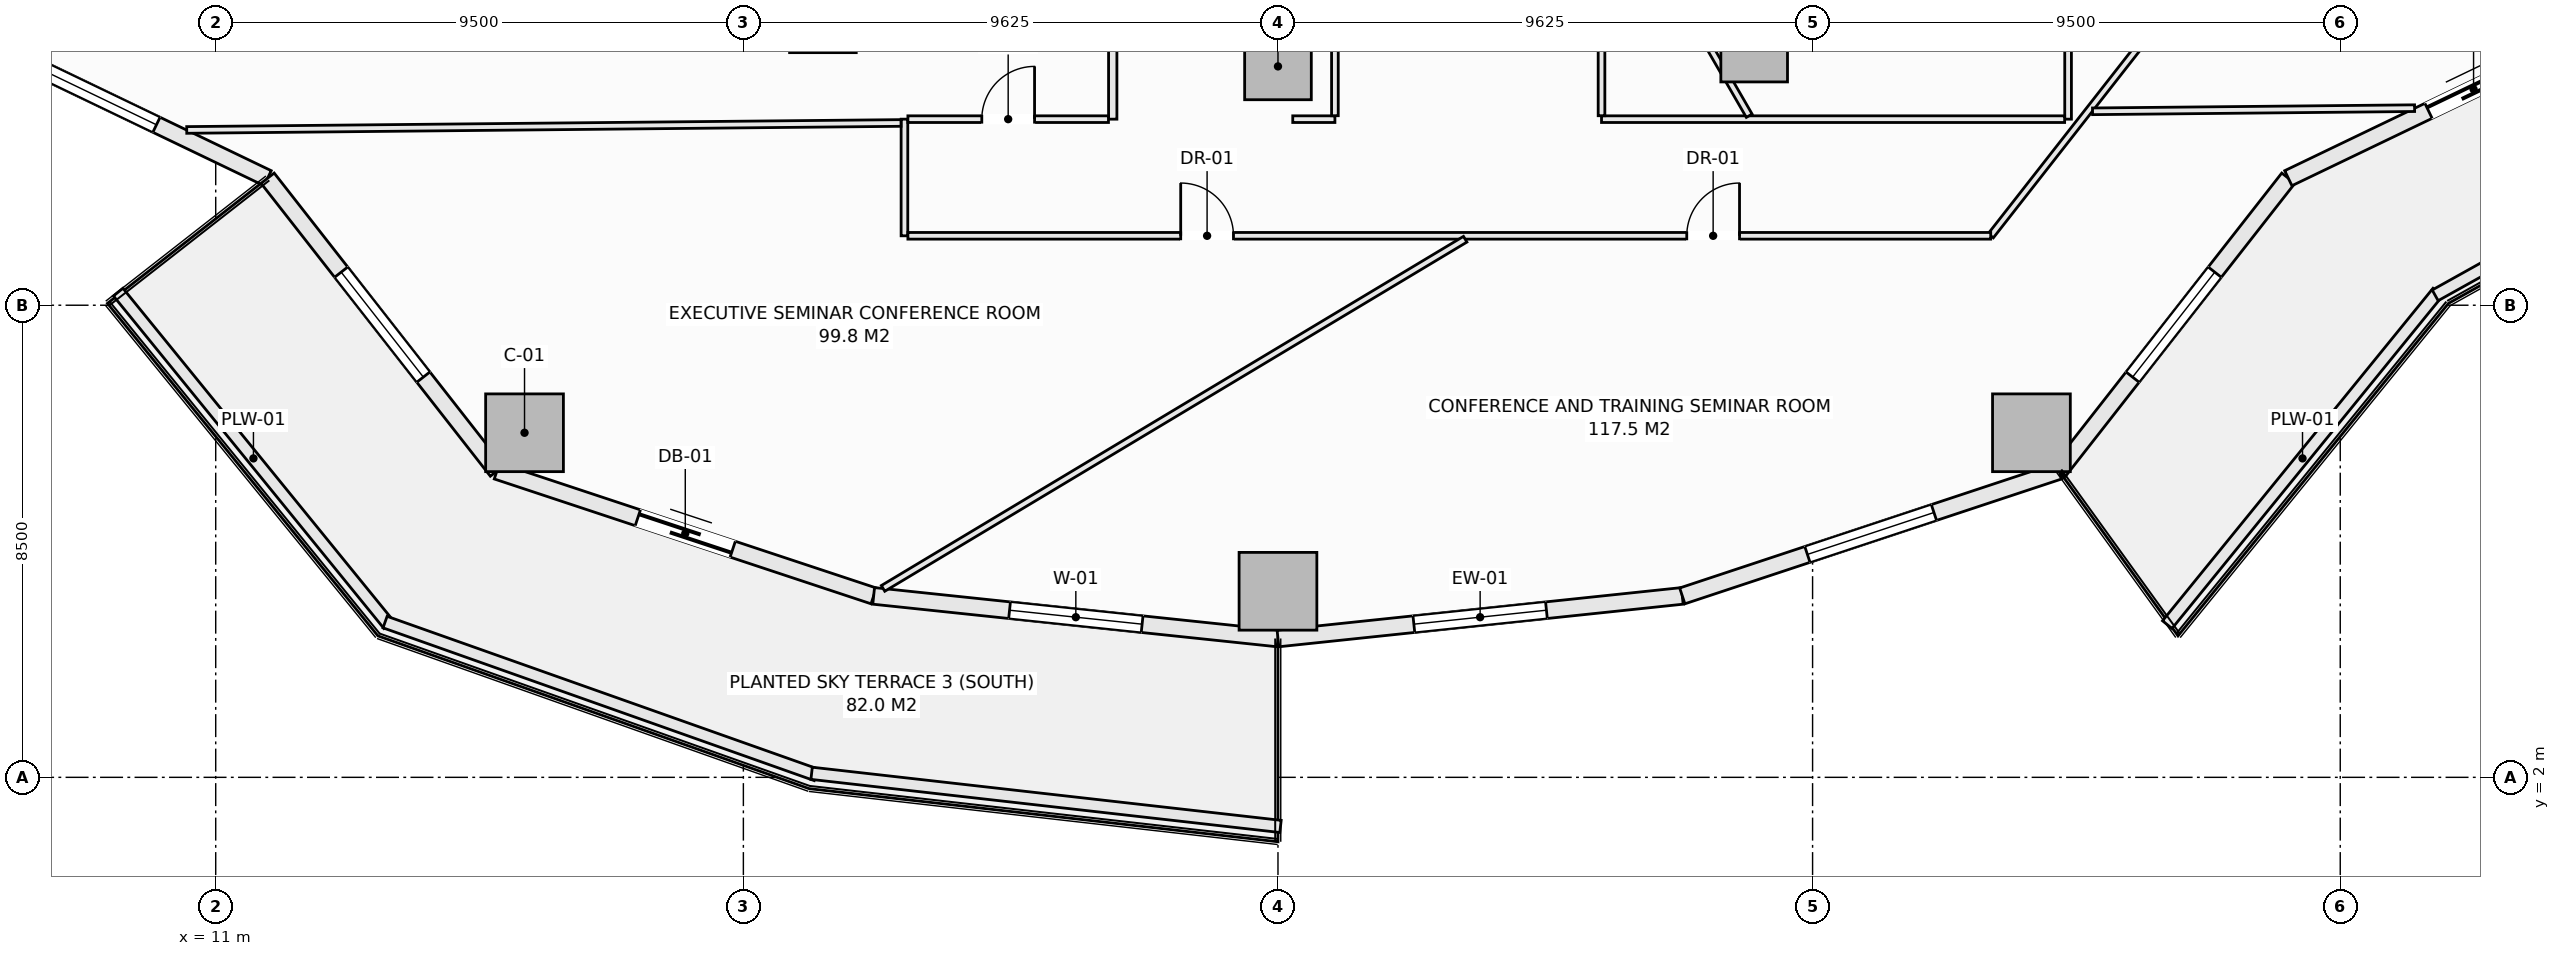
"""IFC4 building model, lengths in metres.
Left out: names, types, materials, properties, quantities, classifications, styles, units other than length and angle.
Written with IfcOpenShell. Run it as: python <this file> out.ifc"""

import sys

from ifc_helpers import new_model, si_unit, direction, frame, frame_2d, origin, origin_2d, place, context, subcontext, project, spatial, rectangle, extrude, element, fill, save


model = new_model("IFC4")
c1 = context("Model", 3, precision=1e-05, world=origin(), true_north=direction((0.0, 1.0)))
c2 = subcontext(c1, "Body", "Model", "MODEL_VIEW")
j1 = project(units=[si_unit("LENGTHUNIT", "METRE"), si_unit("PLANEANGLEUNIT", "RADIAN")], contexts=[c1])
p1 = place(None, origin())
s1 = spatial("IfcSite", under=j1, at=p1, CompositionType="ELEMENT")
p2 = place(p1, origin())
s2 = spatial("IfcBuilding", under=s1, at=p2, CompositionType="ELEMENT")
p3 = place(p2, frame((0.0, 0.0, 41.9)))
s3 = spatial("IfcBuildingStorey", under=s2, at=p3, CompositionType="ELEMENT", Elevation=41.9)
for number, where, z_axis, x_axis in (
    (1, (16.56, 8.204, -0.28), (0.0, 0.0, 1.0), (1.0, 0.0, 0.0)),
    (2, (30.125, 5.35, -0.28), (0.0, 0.0, 1.0), (1.0, 0.0, 0.0)),
    (3, (43.69, 8.204, -0.28), (0.0, 0.0, 1.0), (1.0, 0.0, 0.0)),
):
    element("IfcColumn", number, at=place(p3, frame(where, z_axis=z_axis, x_axis=x_axis)), inside=s3, PredefinedType="COLUMN", context=c2, shape_type="SweptSolid", body=[
        extrude(rectangle(XDim=1.4, YDim=1.4, at=origin_2d()), origin(), (0.0, 0.0, 1.0), 3.85),
    ])
for number, where, z_axis, x_axis in (
    (4, (21.932, 15.648, -0.28), (0.0, 0.0, 1.0), (1.0, 0.0, 0.0)),
    (5, (30.125, 14.8, -0.28), (0.0, 0.0, 1.0), (1.0, 0.0, 0.0)),
    (6, (38.698, 15.121, -0.28), (0.0, 0.0, 1.0), (1.0, 0.0, 0.0)),
):
    element("IfcColumn", number, at=place(p3, frame(where, z_axis=z_axis, x_axis=x_axis)), inside=s3, PredefinedType="COLUMN", context=c2, shape_type="SweptSolid", body=[
        extrude(rectangle(XDim=1.2, YDim=1.2, at=origin_2d()), origin(), (0.0, 0.0, 1.0), 3.85),
    ])
p4 = place(p3, frame((5.768, 15.75, 0.0), z_axis=(0.0, 0.0, 1.0), x_axis=(0.901360393999, -0.433069786673, 0.0)))
e7 = element("IfcWall", 7, at=p4, inside=s3, PredefinedType="SOLIDWALL", context=c2, shape_type="SweptSolid", body=[
    extrude(rectangle(XDim=6.842, YDim=0.3, at=frame_2d((3.421, 0.0))), origin(), (0.0, 0.0, 1.0), 3.093),
])
p5 = place(p4, frame((2.221, 0.0, 0.85)))
e8 = element("IfcOpeningElement", 8, at=p5, cuts=e7, PredefinedType="OPENING", context=c2, shape_type="SweptSolid", body=[
    extrude(rectangle(XDim=2.4, YDim=1.9, at=frame_2d((1.2, 0.95))), frame((0.0, 0.16, 0.0), z_axis=(0.0, -1.0, 0.0), x_axis=(1.0, 0.0, 0.0)), (0.0, 0.0, 1.0), 0.32),
])
p6 = place(p3, frame((11.935, 12.787, 0.0), z_axis=(0.0, 0.0, 1.0), x_axis=(0.616421309777, -0.787416515482, 0.0)))
e9 = element("IfcWall", 9, at=p6, inside=s3, PredefinedType="SOLIDWALL", context=c2, shape_type="SweptSolid", body=[
    extrude(rectangle(XDim=6.696, YDim=0.3, at=frame_2d((3.348, 0.0))), origin(), (0.0, 0.0, 1.0), 3.093),
])
p7 = place(p6, frame((2.148, 0.0, 0.85)))
e10 = element("IfcOpeningElement", 10, at=p7, cuts=e9, PredefinedType="OPENING", context=c2, shape_type="SweptSolid", body=[
    extrude(rectangle(XDim=2.4, YDim=1.9, at=frame_2d((1.2, 0.95))), frame((0.0, 0.16, 0.0), z_axis=(0.0, -1.0, 0.0), x_axis=(1.0, 0.0, 0.0)), (0.0, 0.0, 1.0), 0.32),
])
p8 = place(p3, frame((16.062, 7.514, 0.0), z_axis=(0.0, 0.0, 1.0), x_axis=(0.949238715533, -0.31455661006, 0.0)))
e11 = element("IfcWall", 11, at=p8, inside=s3, PredefinedType="SOLIDWALL", context=c2, shape_type="SweptSolid", body=[
    extrude(rectangle(XDim=7.146, YDim=0.3, at=frame_2d((3.573, 0.0))), origin(), (0.0, 0.0, 1.0), 3.093),
])
p9 = place(p8, frame((2.673, 0.0, 0.0)))
e12 = element("IfcOpeningElement", 12, at=p9, cuts=e11, PredefinedType="OPENING", context=c2, shape_type="SweptSolid", body=[
    extrude(rectangle(XDim=1.8, YDim=2.25, at=frame_2d((0.9, 1.125))), frame((0.0, 0.16, 0.0), z_axis=(0.0, -1.0, 0.0), x_axis=(1.0, 0.0, 0.0)), (0.0, 0.0, 1.0), 0.32),
])
p10 = place(p3, frame((22.846, 5.267, 0.0), z_axis=(0.0, 0.0, 1.0), x_axis=(0.994500334317, -0.104733399844, 0.0)))
e13 = element("IfcWall", 13, at=p10, inside=s3, PredefinedType="SOLIDWALL", context=c2, shape_type="SweptSolid", body=[
    extrude(rectangle(XDim=7.32, YDim=0.3, at=frame_2d((3.66, 0.0))), origin(), (0.0, 0.0, 1.0), 3.093),
])
p11 = place(p10, frame((2.46, 0.0, 0.85)))
e14 = element("IfcOpeningElement", 14, at=p11, cuts=e13, PredefinedType="OPENING", context=c2, shape_type="SweptSolid", body=[
    extrude(rectangle(XDim=2.4, YDim=1.9, at=frame_2d((1.2, 0.95))), frame((0.0, 0.16, 0.0), z_axis=(0.0, -1.0, 0.0), x_axis=(1.0, 0.0, 0.0)), (0.0, 0.0, 1.0), 0.32),
])
p12 = place(p3, frame((30.125, 4.5, 0.0), z_axis=(0.0, 0.0, 1.0), x_axis=(0.994500334317, 0.104733399844, 0.0)))
e15 = element("IfcWall", 15, at=p12, inside=s3, PredefinedType="SOLIDWALL", context=c2, shape_type="SweptSolid", body=[
    extrude(rectangle(XDim=7.32, YDim=0.3, at=frame_2d((3.66, 0.0))), origin(), (0.0, 0.0, 1.0), 3.093),
])
p13 = place(p12, frame((2.46, 0.0, 0.85)))
e16 = element("IfcOpeningElement", 16, at=p13, cuts=e15, PredefinedType="OPENING", context=c2, shape_type="SweptSolid", body=[
    extrude(rectangle(XDim=2.4, YDim=1.9, at=frame_2d((1.2, 0.95))), frame((0.0, 0.16, 0.0), z_axis=(0.0, -1.0, 0.0), x_axis=(1.0, 0.0, 0.0)), (0.0, 0.0, 1.0), 0.32),
])
p14 = place(p3, frame((37.404, 5.267, 0.0), z_axis=(0.0, 0.0, 1.0), x_axis=(0.949238715533, 0.31455661006, 0.0)))
e17 = element("IfcWall", 17, at=p14, inside=s3, PredefinedType="SOLIDWALL", context=c2, shape_type="SweptSolid", body=[
    extrude(rectangle(XDim=7.146, YDim=0.3, at=frame_2d((3.573, 0.0))), origin(), (0.0, 0.0, 1.0), 3.093),
])
p15 = place(p14, frame((2.373, 0.0, 0.85)))
e18 = element("IfcOpeningElement", 18, at=p15, cuts=e17, PredefinedType="OPENING", context=c2, shape_type="SweptSolid", body=[
    extrude(rectangle(XDim=2.4, YDim=1.9, at=frame_2d((1.2, 0.95))), frame((0.0, 0.16, 0.0), z_axis=(0.0, -1.0, 0.0), x_axis=(1.0, 0.0, 0.0)), (0.0, 0.0, 1.0), 0.32),
])
p16 = place(p3, frame((44.188, 7.514, 0.0), z_axis=(0.0, 0.0, 1.0), x_axis=(0.616421309777, 0.787416515482, 0.0)))
e19 = element("IfcWall", 19, at=p16, inside=s3, PredefinedType="SOLIDWALL", context=c2, shape_type="SweptSolid", body=[
    extrude(rectangle(XDim=6.696, YDim=0.3, at=frame_2d((3.348, 0.0))), origin(), (0.0, 0.0, 1.0), 3.093),
])
p17 = place(p16, frame((2.148, 0.0, 0.85)))
e20 = element("IfcOpeningElement", 20, at=p17, cuts=e19, PredefinedType="OPENING", context=c2, shape_type="SweptSolid", body=[
    extrude(rectangle(XDim=2.4, YDim=1.9, at=frame_2d((1.2, 0.95))), frame((0.0, 0.16, 0.0), z_axis=(0.0, -1.0, 0.0), x_axis=(1.0, 0.0, 0.0)), (0.0, 0.0, 1.0), 0.32),
])
p18 = place(p3, frame((48.315, 12.787, 0.0), z_axis=(0.0, 0.0, 1.0), x_axis=(0.901360393999, 0.433069786673, 0.0)))
e21 = element("IfcWall", 21, at=p18, inside=s3, PredefinedType="SOLIDWALL", context=c2, shape_type="SweptSolid", body=[
    extrude(rectangle(XDim=6.842, YDim=0.3, at=frame_2d((3.421, 0.0))), origin(), (0.0, 0.0, 1.0), 3.093),
])
p19 = place(p18, frame((2.8, 0.0, 0.0)))
e22 = element("IfcOpeningElement", 22, at=p19, cuts=e21, PredefinedType="OPENING", context=c2, shape_type="SweptSolid", body=[
    extrude(rectangle(XDim=1.8, YDim=2.25, at=frame_2d((0.9, 1.125))), frame((0.0, 0.16, 0.0), z_axis=(0.0, -1.0, 0.0), x_axis=(1.0, 0.0, 0.0)), (0.0, 0.0, 1.0), 0.32),
])
p20 = place(p3, frame((9.244, 10.736, 0.0), z_axis=(0.0, 0.0, 1.0), x_axis=(0.630997450658, -0.775784903993, 0.0)))
e23 = element("IfcWall", 23, at=p20, inside=s3, PredefinedType="PARAPET", context=c2, shape_type="SweptSolid", body=[
    extrude(rectangle(XDim=7.718, YDim=0.22, at=frame_2d((3.859, 0.0))), origin(), (0.0, 0.0, 1.0), 0.52),
])
p21 = place(p3, frame((14.049, 4.795, 0.0), z_axis=(0.0, 0.0, 1.0), x_axis=(0.942581348797, -0.333976647237, 0.0)))
e24 = element("IfcWall", 24, at=p21, inside=s3, PredefinedType="PARAPET", context=c2, shape_type="SweptSolid", body=[
    extrude(rectangle(XDim=8.236, YDim=0.22, at=frame_2d((4.118, 0.0))), origin(), (0.0, 0.0, 1.0), 0.52),
])
p22 = place(p3, frame((21.729, 2.073, 0.0), z_axis=(0.0, 0.0, 1.0), x_axis=(0.993644541351, -0.112563428535, 0.0)))
e25 = element("IfcWall", 25, at=p22, inside=s3, PredefinedType="PARAPET", context=c2, shape_type="SweptSolid", body=[
    extrude(rectangle(XDim=8.496, YDim=0.22, at=frame_2d((4.248, 0.0))), origin(), (0.0, 0.0, 1.0), 0.52),
])
p23 = place(p3, frame((46.136, 4.749, 0.0), z_axis=(0.0, 0.0, 1.0), x_axis=(0.630997450658, 0.775784903993, 0.0)))
e26 = element("IfcWall", 26, at=p23, inside=s3, PredefinedType="PARAPET", context=c2, shape_type="SweptSolid", body=[
    extrude(rectangle(XDim=7.718, YDim=0.22, at=frame_2d((3.859, 0.0))), origin(), (0.0, 0.0, 1.0), 0.52),
])
p24 = place(p3, frame((50.959, 10.678, 0.0), z_axis=(0.0, 0.0, 1.0), x_axis=(0.873500119739, 0.48682393205, 0.0)))
e27 = element("IfcWall", 27, at=p24, inside=s3, PredefinedType="PARAPET", context=c2, shape_type="SweptSolid", body=[
    extrude(rectangle(XDim=7.562, YDim=0.22, at=frame_2d((3.781, 0.0))), origin(), (0.0, 0.0, 1.0), 0.52),
])
p25 = place(p3, frame((27.15, 13.85, 0.0), z_axis=(0.0, 0.0, 1.0), x_axis=(0.0, 1.0, 0.0)))
e28 = element("IfcWall", 28, at=p25, inside=s3, PredefinedType="PARTITIONING", context=c2, shape_type="SweptSolid", body=[
    extrude(rectangle(XDim=3.123, YDim=0.15, at=frame_2d((1.562, 0.0))), origin(), (0.0, 0.0, 1.0), 3.57),
])
p26 = place(p3, frame((44.35, 13.85, 0.0), z_axis=(0.0, 0.0, 1.0), x_axis=(0.0, 1.0, 0.0)))
e29 = element("IfcWall", 29, at=p26, inside=s3, PredefinedType="PARTITIONING", context=c2, shape_type="SweptSolid", body=[
    extrude(rectangle(XDim=9.17, YDim=0.12, at=frame_2d((4.585, 0.0))), origin(), (0.0, 0.0, 1.0), 3.57),
])
p27 = place(p26, frame((4.11, 0.0, 0.0)))
e30 = element("IfcOpeningElement", 30, at=p27, cuts=e29, PredefinedType="OPENING", context=c2, shape_type="SweptSolid", body=[
    extrude(rectangle(XDim=0.95, YDim=2.1, at=frame_2d((0.475, 1.05))), frame((0.0, 0.07, 0.0), z_axis=(0.0, -1.0, 0.0), x_axis=(1.0, 0.0, 0.0)), (0.0, 0.0, 1.0), 0.14),
])
p28 = place(p3, frame((23.4, 11.75, 0.0), z_axis=(0.0, 0.0, 1.0), x_axis=(0.0, 1.0, 0.0)))
e31 = element("IfcWall", 31, at=p28, inside=s3, PredefinedType="PARTITIONING", context=c2, shape_type="SweptSolid", body=[
    extrude(rectangle(XDim=2.1, YDim=0.12, at=frame_2d((1.05, 0.0))), origin(), (0.0, 0.0, 1.0), 3.57),
])
p29 = place(p3, frame((42.957, 11.75, 0.0), z_axis=(0.0, 0.0, 1.0), x_axis=(0.616428289415, 0.78741105149, 0.0)))
e32 = element("IfcWall", 32, at=p29, inside=s3, PredefinedType="PARTITIONING", context=c2, shape_type="SweptSolid", body=[
    extrude(rectangle(XDim=5.375, YDim=0.12, at=frame_2d((2.687, 0.0))), origin(), (0.0, 0.0, 1.0), 3.57),
])
p30 = place(p3, frame((23.462, 11.75, 0.0), z_axis=(0.0, 0.0, 1.0), x_axis=(1.0, 0.0, 0.0)))
e33 = element("IfcWall", 33, at=p30, inside=s3, PredefinedType="PARTITIONING", context=c2, shape_type="SweptSolid", body=[
    extrude(rectangle(XDim=19.495, YDim=0.12, at=frame_2d((9.748, 0.0))), origin(), (0.0, 0.0, 1.0), 3.57),
])
p31 = place(p30, frame((4.912, 0.0, 0.0)))
e34 = element("IfcOpeningElement", 34, at=p31, cuts=e33, PredefinedType="OPENING", context=c2, shape_type="SweptSolid", body=[
    extrude(rectangle(XDim=0.95, YDim=2.1, at=frame_2d((0.475, 1.05))), frame((0.0, 0.07, 0.0), z_axis=(0.0, -1.0, 0.0), x_axis=(1.0, 0.0, 0.0)), (0.0, 0.0, 1.0), 0.14),
])
p32 = place(p30, frame((14.023, 0.0, 0.0)))
e35 = element("IfcOpeningElement", 35, at=p32, cuts=e33, PredefinedType="OPENING", context=c2, shape_type="SweptSolid", body=[
    extrude(rectangle(XDim=0.95, YDim=2.1, at=frame_2d((0.475, 1.05))), frame((0.0, 0.07, 0.0), z_axis=(0.0, -1.0, 0.0), x_axis=(1.0, 0.0, 0.0)), (0.0, 0.0, 1.0), 0.14),
])
p33 = place(p3, frame((23.462, 13.85, 0.0), z_axis=(0.0, 0.0, 1.0), x_axis=(1.0, 0.0, 0.0)))
e36 = element("IfcWall", 36, at=p33, inside=s3, PredefinedType="PARTITIONING", context=c2, shape_type="SweptSolid", body=[
    extrude(rectangle(XDim=3.611, YDim=0.12, at=frame_2d((1.806, 0.0))), origin(), (0.0, 0.0, 1.0), 3.57),
])
p34 = place(p33, frame((1.331, 0.0, 0.0)))
e37 = element("IfcOpeningElement", 37, at=p34, cuts=e36, PredefinedType="OPENING", context=c2, shape_type="SweptSolid", body=[
    extrude(rectangle(XDim=0.95, YDim=2.1, at=frame_2d((0.475, 1.05))), frame((0.0, 0.07, 0.0), z_axis=(0.0, -1.0, 0.0), x_axis=(1.0, 0.0, 0.0)), (0.0, 0.0, 1.0), 0.14),
])
p35 = place(p3, frame((30.391, 13.85, 0.0), z_axis=(0.0, 0.0, 1.0), x_axis=(1.0, 0.0, 0.0)))
e38 = element("IfcWall", 38, at=p35, inside=s3, PredefinedType="PARTITIONING", context=c2, shape_type="SweptSolid", body=[
    extrude(rectangle(XDim=0.759, YDim=0.12, at=frame_2d((0.379, 0.0))), origin(), (0.0, 0.0, 1.0), 3.57),
])
p36 = place(p3, frame((35.95, 13.85, 0.0), z_axis=(0.0, 0.0, 1.0), x_axis=(1.0, 0.0, 0.0)))
e39 = element("IfcWall", 39, at=p36, inside=s3, PredefinedType="PARTITIONING", context=c2, shape_type="SweptSolid", body=[
    extrude(rectangle(XDim=8.338, YDim=0.12, at=frame_2d((4.169, 0.0))), origin(), (0.0, 0.0, 1.0), 3.57),
])
for number, where, z_axis, x_axis in (
    (40, (35.95, 13.912, 0.0), (0.0, 0.0, 1.0), (0.0, 1.0, 0.0)),
    (41, (31.15, 13.912, 0.0), (0.0, 0.0, 1.0), (0.0, 1.0, 0.0)),
):
    element("IfcWall", number, at=place(p3, frame(where, z_axis=z_axis, x_axis=x_axis)), inside=s3, PredefinedType="PARTITIONING", context=c2, shape_type="SweptSolid", body=[
        extrude(rectangle(XDim=1.676, YDim=0.12, at=frame_2d((0.838, 0.0))), origin(), (0.0, 0.0, 1.0), 3.57),
    ])
p37 = place(p3, frame((10.478, 13.656, 0.0), z_axis=(0.0, 0.0, 1.0), x_axis=(0.999952019801, 0.009795820292, 0.0)))
e42 = element("IfcWall", 42, at=p37, inside=s3, PredefinedType="PARTITIONING", context=c2, shape_type="SweptSolid", body=[
    extrude(rectangle(XDim=12.86, YDim=0.12, at=frame_2d((6.43, 0.0))), origin(), (0.0, 0.0, 1.0), 3.205),
])
p38 = place(p3, frame((44.79, 13.991, 0.0), z_axis=(0.0, 0.0, 1.0), x_axis=(0.999951876208, 0.009810467268, 0.0)))
e43 = element("IfcWall", 43, at=p38, inside=s3, PredefinedType="PARTITIONING", context=c2, shape_type="SweptSolid", body=[
    extrude(rectangle(XDim=5.798, YDim=0.12, at=frame_2d((2.899, 0.0))), origin(), (0.0, 0.0, 1.0), 3.205),
])
p39 = place(p3, frame((23.015, 5.402, 0.0), z_axis=(0.0, 0.0, 1.0), x_axis=(0.85756694703, 0.514372366444, 0.0)))
e44 = element("IfcWall", 44, at=p39, inside=s3, PredefinedType="PARTITIONING", context=c2, shape_type="SweptSolid", body=[
    extrude(rectangle(XDim=12.221, YDim=0.12, at=frame_2d((6.111, 0.0))), origin(), (0.0, 0.0, 1.0), 3.57),
])
p40 = place(p3, frame((37.642, 15.588, 0.0), z_axis=(0.0, 0.0, 1.0), x_axis=(0.499911776505, -0.866076333652, 0.0)))
e45 = element("IfcWall", 45, at=p40, inside=s3, PredefinedType="PARTITIONING", context=c2, shape_type="SweptSolid", body=[
    extrude(rectangle(XDim=1.935, YDim=0.12, at=frame_2d((0.967, 0.0))), origin(), (0.0, 0.0, 1.0), 3.57),
])
p41 = place(p5, origin())
e46 = element("IfcWindow", 46, at=p41, inside=s3, PartitioningType="SINGLE_PANEL", PredefinedType="WINDOW", context=c2, shape_type="SweptSolid", body=[
    extrude(rectangle(XDim=2.4, YDim=1.9, at=frame_2d((1.2, 0.95))), frame((0.0, 0.03, 0.0), z_axis=(0.0, -1.0, 0.0), x_axis=(1.0, 0.0, 0.0)), (0.0, 0.0, 1.0), 0.06),
])
fill(e8, e46)
p42 = place(p7, origin())
e47 = element("IfcWindow", 47, at=p42, inside=s3, PartitioningType="SINGLE_PANEL", PredefinedType="WINDOW", context=c2, shape_type="SweptSolid", body=[
    extrude(rectangle(XDim=2.4, YDim=1.9, at=frame_2d((1.2, 0.95))), frame((0.0, 0.03, 0.0), z_axis=(0.0, -1.0, 0.0), x_axis=(1.0, 0.0, 0.0)), (0.0, 0.0, 1.0), 0.06),
])
fill(e10, e47)
p43 = place(p9, frame((1.8, 0.0, 0.0), z_axis=(0.0, 0.0, 1.0), x_axis=(-1.0, 0.0, 0.0)))
e48 = element("IfcDoor", 48, at=p43, inside=s3, OperationType="SLIDING_TO_LEFT", PredefinedType="DOOR", context=c2, shape_type="SweptSolid", body=[
    extrude(rectangle(XDim=1.8, YDim=2.25, at=frame_2d((0.9, 1.125))), frame((0.0, 0.025, 0.0), z_axis=(0.0, -1.0, 0.0), x_axis=(1.0, 0.0, 0.0)), (0.0, 0.0, 1.0), 0.05),
])
fill(e12, e48)
p44 = place(p11, origin())
e49 = element("IfcWindow", 49, at=p44, inside=s3, PartitioningType="SINGLE_PANEL", PredefinedType="WINDOW", context=c2, shape_type="SweptSolid", body=[
    extrude(rectangle(XDim=2.4, YDim=1.9, at=frame_2d((1.2, 0.95))), frame((0.0, 0.03, 0.0), z_axis=(0.0, -1.0, 0.0), x_axis=(1.0, 0.0, 0.0)), (0.0, 0.0, 1.0), 0.06),
])
fill(e14, e49)
p45 = place(p13, origin())
e50 = element("IfcWindow", 50, at=p45, inside=s3, PartitioningType="SINGLE_PANEL", PredefinedType="WINDOW", context=c2, shape_type="SweptSolid", body=[
    extrude(rectangle(XDim=2.4, YDim=1.9, at=frame_2d((1.2, 0.95))), frame((0.0, 0.03, 0.0), z_axis=(0.0, -1.0, 0.0), x_axis=(1.0, 0.0, 0.0)), (0.0, 0.0, 1.0), 0.06),
])
fill(e16, e50)
p46 = place(p15, origin())
e51 = element("IfcWindow", 51, at=p46, inside=s3, PartitioningType="SINGLE_PANEL", PredefinedType="WINDOW", context=c2, shape_type="SweptSolid", body=[
    extrude(rectangle(XDim=2.4, YDim=1.9, at=frame_2d((1.2, 0.95))), frame((0.0, 0.03, 0.0), z_axis=(0.0, -1.0, 0.0), x_axis=(1.0, 0.0, 0.0)), (0.0, 0.0, 1.0), 0.06),
])
fill(e18, e51)
p47 = place(p17, origin())
e52 = element("IfcWindow", 52, at=p47, inside=s3, PartitioningType="SINGLE_PANEL", PredefinedType="WINDOW", context=c2, shape_type="SweptSolid", body=[
    extrude(rectangle(XDim=2.4, YDim=1.9, at=frame_2d((1.2, 0.95))), frame((0.0, 0.03, 0.0), z_axis=(0.0, -1.0, 0.0), x_axis=(1.0, 0.0, 0.0)), (0.0, 0.0, 1.0), 0.06),
])
fill(e20, e52)
p48 = place(p19, frame((1.8, 0.0, 0.0), z_axis=(0.0, 0.0, 1.0), x_axis=(-1.0, 0.0, 0.0)))
e53 = element("IfcDoor", 53, at=p48, inside=s3, OperationType="SLIDING_TO_LEFT", PredefinedType="DOOR", context=c2, shape_type="SweptSolid", body=[
    extrude(rectangle(XDim=1.8, YDim=2.25, at=frame_2d((0.9, 1.125))), frame((0.0, 0.025, 0.0), z_axis=(0.0, -1.0, 0.0), x_axis=(1.0, 0.0, 0.0)), (0.0, 0.0, 1.0), 0.05),
])
fill(e22, e53)
p49 = place(p34, origin())
e54 = element("IfcDoor", 54, at=p49, inside=s3, OperationType="SINGLE_SWING_RIGHT", PredefinedType="DOOR", context=c2, shape_type="SweptSolid", body=[
    extrude(rectangle(XDim=0.95, YDim=2.1, at=frame_2d((0.475, 1.05))), frame((0.0, 0.025, 0.0), z_axis=(0.0, -1.0, 0.0), x_axis=(1.0, 0.0, 0.0)), (0.0, 0.0, 1.0), 0.05),
])
fill(e37, e54)
p50 = place(p31, origin())
e55 = element("IfcDoor", 55, at=p50, inside=s3, OperationType="SINGLE_SWING_LEFT", PredefinedType="DOOR", context=c2, shape_type="SweptSolid", body=[
    extrude(rectangle(XDim=0.95, YDim=2.1, at=frame_2d((0.475, 1.05))), frame((0.0, 0.025, 0.0), z_axis=(0.0, -1.0, 0.0), x_axis=(1.0, 0.0, 0.0)), (0.0, 0.0, 1.0), 0.05),
])
fill(e34, e55)
p51 = place(p32, origin())
e56 = element("IfcDoor", 56, at=p51, inside=s3, OperationType="SINGLE_SWING_RIGHT", PredefinedType="DOOR", context=c2, shape_type="SweptSolid", body=[
    extrude(rectangle(XDim=0.95, YDim=2.1, at=frame_2d((0.475, 1.05))), frame((0.0, 0.025, 0.0), z_axis=(0.0, -1.0, 0.0), x_axis=(1.0, 0.0, 0.0)), (0.0, 0.0, 1.0), 0.05),
])
fill(e35, e56)
save(model, sys.argv[1])
